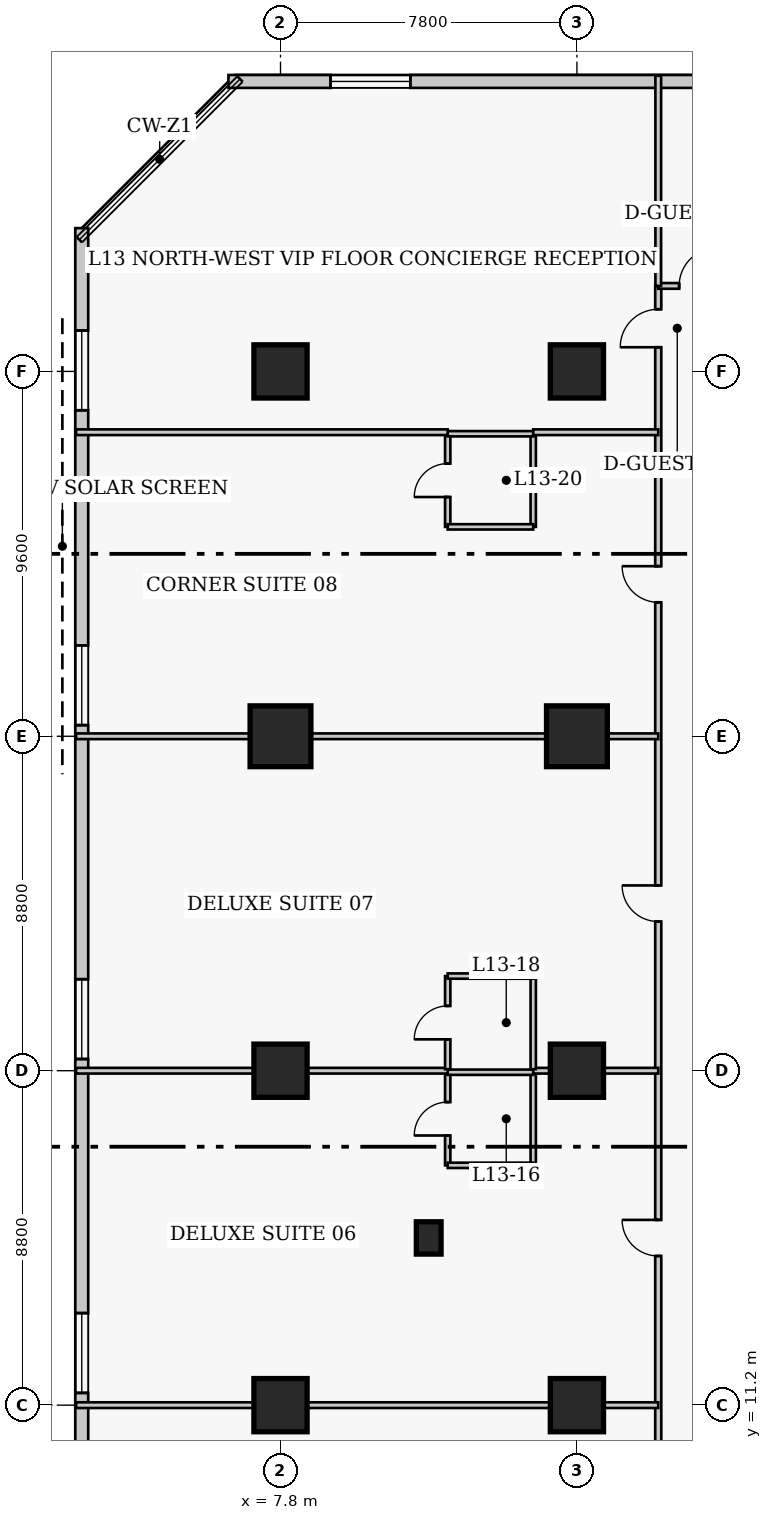
"""IFC4 building model, lengths in metres.
Left out: names, types, materials, properties, quantities, classifications, styles, units other than length and angle.
Written with IfcOpenShell. Run it as: python <this file> out.ifc"""

import sys

from ifc_helpers import new_model, si_unit, direction, frame, frame_2d, origin, origin_2d, place, context, subcontext, project, spatial, rectangle, extrude, element, fill, save


model = new_model("IFC4")
c1 = context("Model", 3, precision=1e-05, world=origin(), true_north=direction((0.0, 1.0)))
c2 = subcontext(c1, "Body", "Model", "MODEL_VIEW")
j1 = project(units=[si_unit("LENGTHUNIT", "METRE"), si_unit("PLANEANGLEUNIT", "RADIAN")], contexts=[c1])
p1 = place(None, origin())
s1 = spatial("IfcSite", under=j1, at=p1, CompositionType="ELEMENT")
p2 = place(p1, origin())
s2 = spatial("IfcBuilding", under=s1, at=p2, CompositionType="ELEMENT")
p3 = place(p2, frame((0.0, 0.0, 56.4)))
s3 = spatial("IfcBuildingStorey", under=s2, at=p3, CompositionType="ELEMENT", Elevation=56.4)
for number, where, z_axis, x_axis in (
    (1, (7.8, 11.2, 0.0), (0.0, 0.0, 1.0), (1.0, 0.0, 0.0)),
    (2, (7.8, 20.0, 0.0), (0.0, 0.0, 1.0), (1.0, 0.0, 0.0)),
):
    element("IfcColumn", number, at=place(p3, frame(where, z_axis=z_axis, x_axis=x_axis)), inside=s3, PredefinedType="COLUMN", context=c2, shape_type="SweptSolid", body=[
        extrude(rectangle(XDim=1.4, YDim=1.4, at=origin_2d()), origin(), (0.0, 0.0, 1.0), 3.8),
    ])
p4 = place(p3, frame((7.8, 28.8, 0.0), z_axis=(0.0, 0.0, 1.0), x_axis=(1.0, 0.0, 0.0)))
e3 = element("IfcColumn", 3, at=p4, inside=s3, PredefinedType="COLUMN", context=c2, shape_type="SweptSolid", body=[
    extrude(rectangle(XDim=1.6, YDim=1.6, at=origin_2d()), origin(), (0.0, 0.0, 1.0), 3.8),
])
for number, where, z_axis, x_axis in (
    (4, (7.8, 38.4, 0.0), (0.0, 0.0, 1.0), (1.0, 0.0, 0.0)),
    (5, (15.6, 11.2, 0.0), (0.0, 0.0, 1.0), (1.0, 0.0, 0.0)),
    (6, (15.6, 20.0, 0.0), (0.0, 0.0, 1.0), (1.0, 0.0, 0.0)),
):
    element("IfcColumn", number, at=place(p3, frame(where, z_axis=z_axis, x_axis=x_axis)), inside=s3, PredefinedType="COLUMN", context=c2, shape_type="SweptSolid", body=[
        extrude(rectangle(XDim=1.4, YDim=1.4, at=origin_2d()), origin(), (0.0, 0.0, 1.0), 3.8),
    ])
p5 = place(p3, frame((15.6, 28.8, 0.0), z_axis=(0.0, 0.0, 1.0), x_axis=(1.0, 0.0, 0.0)))
e7 = element("IfcColumn", 7, at=p5, inside=s3, PredefinedType="COLUMN", context=c2, shape_type="SweptSolid", body=[
    extrude(rectangle(XDim=1.6, YDim=1.6, at=origin_2d()), origin(), (0.0, 0.0, 1.0), 3.8),
])
p6 = place(p3, frame((15.6, 38.4, 0.0), z_axis=(0.0, 0.0, 1.0), x_axis=(1.0, 0.0, 0.0)))
e8 = element("IfcColumn", 8, at=p6, inside=s3, PredefinedType="COLUMN", context=c2, shape_type="SweptSolid", body=[
    extrude(rectangle(XDim=1.4, YDim=1.4, at=origin_2d()), origin(), (0.0, 0.0, 1.0), 3.8),
])
p7 = place(p3, frame((11.7, 15.6, 0.0), z_axis=(0.0, 0.0, 1.0), x_axis=(1.0, 0.0, 0.0)))
e9 = element("IfcColumn", 9, at=p7, inside=s3, PredefinedType="PILASTER", context=c2, shape_type="SweptSolid", body=[
    extrude(rectangle(XDim=0.65, YDim=0.85, at=origin_2d()), origin(), (0.0, 0.0, 1.0), 3.8),
])
p8 = place(p3, frame((36.32, 46.03, 0.0), z_axis=(0.0, 0.0, 1.0), x_axis=(-1.0, 0.0, 0.0)))
e10 = element("IfcWall", 10, at=p8, inside=s3, PredefinedType="SOLIDWALL", context=c2, shape_type="SweptSolid", body=[
    extrude(rectangle(XDim=29.89, YDim=0.34, at=frame_2d((14.945, 0.0))), origin(), (0.0, 0.0, 1.0), 3.54),
])
p9 = place(p8, frame((2.686, 0.0, 0.85)))
e11 = element("IfcOpeningElement", 11, at=p9, cuts=e10, PredefinedType="OPENING", context=c2, shape_type="SweptSolid", body=[
    extrude(rectangle(XDim=2.1, YDim=1.85, at=frame_2d((1.05, 0.925))), frame((0.0, 0.18, 0.0), z_axis=(0.0, -1.0, 0.0), x_axis=(1.0, 0.0, 0.0)), (0.0, 0.0, 1.0), 0.36),
])
p10 = place(p8, frame((10.159, 0.0, 0.85)))
e12 = element("IfcOpeningElement", 12, at=p10, cuts=e10, PredefinedType="OPENING", context=c2, shape_type="SweptSolid", body=[
    extrude(rectangle(XDim=2.1, YDim=1.85, at=frame_2d((1.05, 0.925))), frame((0.0, 0.18, 0.0), z_axis=(0.0, -1.0, 0.0), x_axis=(1.0, 0.0, 0.0)), (0.0, 0.0, 1.0), 0.36),
])
p11 = place(p8, frame((25.104, 0.0, 0.85)))
e13 = element("IfcOpeningElement", 13, at=p11, cuts=e10, PredefinedType="OPENING", context=c2, shape_type="SweptSolid", body=[
    extrude(rectangle(XDim=2.1, YDim=1.85, at=frame_2d((1.05, 0.925))), frame((0.0, 0.18, 0.0), z_axis=(0.0, -1.0, 0.0), x_axis=(1.0, 0.0, 0.0)), (0.0, 0.0, 1.0), 0.36),
])
p12 = place(p3, frame((2.57, 42.17, 0.0), z_axis=(0.0, 0.0, 1.0), x_axis=(0.0, -1.0, 0.0)))
e14 = element("IfcWall", 14, at=p12, inside=s3, PredefinedType="SOLIDWALL", context=c2, shape_type="SweptSolid", body=[
    extrude(rectangle(XDim=35.14, YDim=0.34, at=frame_2d((17.57, 0.0))), origin(), (0.0, 0.0, 1.0), 3.54),
])
p13 = place(p12, frame((2.692, 0.0, 0.85)))
e15 = element("IfcOpeningElement", 15, at=p13, cuts=e14, PredefinedType="OPENING", context=c2, shape_type="SweptSolid", body=[
    extrude(rectangle(XDim=2.1, YDim=1.85, at=frame_2d((1.05, 0.925))), frame((0.0, 0.18, 0.0), z_axis=(0.0, -1.0, 0.0), x_axis=(1.0, 0.0, 0.0)), (0.0, 0.0, 1.0), 0.36),
])
p14 = place(p12, frame((10.978, 0.0, 0.85)))
e16 = element("IfcOpeningElement", 16, at=p14, cuts=e14, PredefinedType="OPENING", context=c2, shape_type="SweptSolid", body=[
    extrude(rectangle(XDim=2.1, YDim=1.85, at=frame_2d((1.05, 0.925))), frame((0.0, 0.18, 0.0), z_axis=(0.0, -1.0, 0.0), x_axis=(1.0, 0.0, 0.0)), (0.0, 0.0, 1.0), 0.36),
])
p15 = place(p12, frame((19.762, 0.0, 0.85)))
e17 = element("IfcOpeningElement", 17, at=p15, cuts=e14, PredefinedType="OPENING", context=c2, shape_type="SweptSolid", body=[
    extrude(rectangle(XDim=2.1, YDim=1.85, at=frame_2d((1.05, 0.925))), frame((0.0, 0.18, 0.0), z_axis=(0.0, -1.0, 0.0), x_axis=(1.0, 0.0, 0.0)), (0.0, 0.0, 1.0), 0.36),
])
p16 = place(p12, frame((28.548, 0.0, 0.85)))
e18 = element("IfcOpeningElement", 18, at=p16, cuts=e14, PredefinedType="OPENING", context=c2, shape_type="SweptSolid", body=[
    extrude(rectangle(XDim=2.1, YDim=1.85, at=frame_2d((1.05, 0.925))), frame((0.0, 0.18, 0.0), z_axis=(0.0, -1.0, 0.0), x_axis=(1.0, 0.0, 0.0)), (0.0, 0.0, 1.0), 0.36),
])
p17 = place(p3, frame((17.74, 5.05, 0.0), z_axis=(0.0, 0.0, 1.0), x_axis=(0.0, 1.0, 0.0)))
e19 = element("IfcWall", 19, at=p17, inside=s3, PredefinedType="PARTITIONING", context=c2, shape_type="SweptSolid", body=[
    extrude(rectangle(XDim=35.6, YDim=0.16, at=frame_2d((17.8, 0.0))), origin(), (0.0, 0.0, 1.0), 3.54),
])
p18 = place(p17, frame((2.6, 0.0, 0.0)))
e20 = element("IfcOpeningElement", 20, at=p18, cuts=e19, PredefinedType="OPENING", context=c2, shape_type="SweptSolid", body=[
    extrude(rectangle(XDim=0.95, YDim=2.1, at=frame_2d((0.475, 1.05))), frame((0.0, 0.09, 0.0), z_axis=(0.0, -1.0, 0.0), x_axis=(1.0, 0.0, 0.0)), (0.0, 0.0, 1.0), 0.18),
])
p19 = place(p17, frame((10.075, 0.0, 0.0)))
e21 = element("IfcOpeningElement", 21, at=p19, cuts=e19, PredefinedType="OPENING", context=c2, shape_type="SweptSolid", body=[
    extrude(rectangle(XDim=0.95, YDim=2.1, at=frame_2d((0.475, 1.05))), frame((0.0, 0.09, 0.0), z_axis=(0.0, -1.0, 0.0), x_axis=(1.0, 0.0, 0.0)), (0.0, 0.0, 1.0), 0.18),
])
p20 = place(p17, frame((18.875, 0.0, 0.0)))
e22 = element("IfcOpeningElement", 22, at=p20, cuts=e19, PredefinedType="OPENING", context=c2, shape_type="SweptSolid", body=[
    extrude(rectangle(XDim=0.95, YDim=2.1, at=frame_2d((0.475, 1.05))), frame((0.0, 0.09, 0.0), z_axis=(0.0, -1.0, 0.0), x_axis=(1.0, 0.0, 0.0)), (0.0, 0.0, 1.0), 0.18),
])
p21 = place(p17, frame((27.275, 0.0, 0.0)))
e23 = element("IfcOpeningElement", 23, at=p21, cuts=e19, PredefinedType="OPENING", context=c2, shape_type="SweptSolid", body=[
    extrude(rectangle(XDim=0.95, YDim=2.1, at=frame_2d((0.475, 1.05))), frame((0.0, 0.09, 0.0), z_axis=(0.0, -1.0, 0.0), x_axis=(1.0, 0.0, 0.0)), (0.0, 0.0, 1.0), 0.18),
])
p22 = place(p17, frame((33.986, 0.0, 0.0)))
e24 = element("IfcOpeningElement", 24, at=p22, cuts=e19, PredefinedType="OPENING", context=c2, shape_type="SweptSolid", body=[
    extrude(rectangle(XDim=1.0, YDim=2.15, at=frame_2d((0.5, 1.075))), frame((0.0, 0.09, 0.0), z_axis=(0.0, -1.0, 0.0), x_axis=(1.0, 0.0, 0.0)), (0.0, 0.0, 1.0), 0.18),
])
p23 = place(p3, frame((17.74, 40.65, 0.0), z_axis=(0.0, 0.0, 1.0), x_axis=(1.0, 0.0, 0.0)))
e25 = element("IfcWall", 25, at=p23, inside=s3, PredefinedType="PARTITIONING", context=c2, shape_type="SweptSolid", body=[
    extrude(rectangle(XDim=4.36, YDim=0.15, at=frame_2d((2.18, 0.0))), origin(), (0.0, 0.0, 1.0), 3.54),
])
p24 = place(p23, frame((0.55, 0.0, 0.0)))
e26 = element("IfcOpeningElement", 26, at=p24, cuts=e25, PredefinedType="OPENING", context=c2, shape_type="SweptSolid", body=[
    extrude(rectangle(XDim=1.0, YDim=2.15, at=frame_2d((0.5, 1.075))), frame((0.0, 0.085, 0.0), z_axis=(0.0, -1.0, 0.0), x_axis=(1.0, 0.0, 0.0)), (0.0, 0.0, 1.0), 0.17),
])
p25 = place(p3, frame((17.74, 40.65, 0.0), z_axis=(0.0, 0.0, 1.0), x_axis=(0.0, 1.0, 0.0)))
e27 = element("IfcWall", 27, at=p25, inside=s3, PredefinedType="PARTITIONING", context=c2, shape_type="SweptSolid", body=[
    extrude(rectangle(XDim=5.53, YDim=0.15, at=frame_2d((2.765, 0.0))), origin(), (0.0, 0.0, 1.0), 3.54),
])
p26 = place(p3, frame((2.42, 11.2, 0.0), z_axis=(0.0, 0.0, 1.0), x_axis=(1.0, 0.0, 0.0)))
e28 = element("IfcWall", 28, at=p26, inside=s3, PredefinedType="PARTITIONING", context=c2, shape_type="SweptSolid", body=[
    extrude(rectangle(XDim=15.32, YDim=0.15, at=frame_2d((7.66, 0.0))), origin(), (0.0, 0.0, 1.0), 2.593),
])
p27 = place(p3, frame((12.2, 17.51, 0.0), z_axis=(0.0, 0.0, 1.0), x_axis=(0.0, 1.0, 0.0)))
e29 = element("IfcWall", 29, at=p27, inside=s3, PredefinedType="PLUMBINGWALL", context=c2, shape_type="SweptSolid", body=[
    extrude(rectangle(XDim=2.45, YDim=0.14, at=frame_2d((1.225, 0.0))), origin(), (0.0, 0.0, 1.0), 3.54),
])
p28 = place(p27, frame((0.785, 0.0, 0.0)))
e30 = element("IfcOpeningElement", 30, at=p28, cuts=e29, PredefinedType="OPENING", context=c2, shape_type="SweptSolid", body=[
    extrude(rectangle(XDim=0.88, YDim=2.05, at=frame_2d((0.44, 1.025))), frame((0.0, 0.08, 0.0), z_axis=(0.0, -1.0, 0.0), x_axis=(1.0, 0.0, 0.0)), (0.0, 0.0, 1.0), 0.16),
])
p29 = place(p3, frame((14.45, 17.51, 0.0), z_axis=(0.0, 0.0, 1.0), x_axis=(0.0, 1.0, 0.0)))
e31 = element("IfcWall", 31, at=p29, inside=s3, PredefinedType="PLUMBINGWALL", context=c2, shape_type="SweptSolid", body=[
    extrude(rectangle(XDim=2.45, YDim=0.14, at=frame_2d((1.225, 0.0))), origin(), (0.0, 0.0, 1.0), 3.54),
])
p30 = place(p3, frame((12.2, 17.51, 0.0), z_axis=(0.0, 0.0, 1.0), x_axis=(1.0, 0.0, 0.0)))
e32 = element("IfcWall", 32, at=p30, inside=s3, PredefinedType="PLUMBINGWALL", context=c2, shape_type="SweptSolid", body=[
    extrude(rectangle(XDim=2.25, YDim=0.14, at=frame_2d((1.125, 0.0))), origin(), (0.0, 0.0, 1.0), 3.54),
])
p31 = place(p3, frame((12.2, 19.96, 0.0), z_axis=(0.0, 0.0, 1.0), x_axis=(1.0, 0.0, 0.0)))
e33 = element("IfcWall", 33, at=p31, inside=s3, PredefinedType="PLUMBINGWALL", context=c2, shape_type="SweptSolid", body=[
    extrude(rectangle(XDim=2.25, YDim=0.14, at=frame_2d((1.125, 0.0))), origin(), (0.0, 0.0, 1.0), 2.593),
])
p32 = place(p3, frame((2.42, 20.0, 0.0), z_axis=(0.0, 0.0, 1.0), x_axis=(1.0, 0.0, 0.0)))
e34 = element("IfcWall", 34, at=p32, inside=s3, PredefinedType="PARTITIONING", context=c2, shape_type="SweptSolid", body=[
    extrude(rectangle(XDim=9.78, YDim=0.15, at=frame_2d((4.89, 0.0))), origin(), (0.0, 0.0, 1.0), 2.593),
])
p33 = place(p3, frame((14.45, 20.0, 0.0), z_axis=(0.0, 0.0, 1.0), x_axis=(1.0, 0.0, 0.0)))
e35 = element("IfcWall", 35, at=p33, inside=s3, PredefinedType="PARTITIONING", context=c2, shape_type="SweptSolid", body=[
    extrude(rectangle(XDim=3.29, YDim=0.15, at=frame_2d((1.645, 0.0))), origin(), (0.0, 0.0, 1.0), 2.593),
])
p34 = place(p3, frame((12.2, 20.04, 0.0), z_axis=(0.0, 0.0, 1.0), x_axis=(0.0, 1.0, 0.0)))
e36 = element("IfcWall", 36, at=p34, inside=s3, PredefinedType="PLUMBINGWALL", context=c2, shape_type="SweptSolid", body=[
    extrude(rectangle(XDim=2.45, YDim=0.14, at=frame_2d((1.225, 0.0))), origin(), (0.0, 0.0, 1.0), 3.54),
])
p35 = place(p34, frame((0.785, 0.0, 0.0)))
e37 = element("IfcOpeningElement", 37, at=p35, cuts=e36, PredefinedType="OPENING", context=c2, shape_type="SweptSolid", body=[
    extrude(rectangle(XDim=0.88, YDim=2.05, at=frame_2d((0.44, 1.025))), frame((0.0, 0.08, 0.0), z_axis=(0.0, -1.0, 0.0), x_axis=(1.0, 0.0, 0.0)), (0.0, 0.0, 1.0), 0.16),
])
p36 = place(p3, frame((14.45, 20.04, 0.0), z_axis=(0.0, 0.0, 1.0), x_axis=(0.0, 1.0, 0.0)))
e38 = element("IfcWall", 38, at=p36, inside=s3, PredefinedType="PLUMBINGWALL", context=c2, shape_type="SweptSolid", body=[
    extrude(rectangle(XDim=2.45, YDim=0.14, at=frame_2d((1.225, 0.0))), origin(), (0.0, 0.0, 1.0), 3.54),
])
p37 = place(p3, frame((12.2, 22.49, 0.0), z_axis=(0.0, 0.0, 1.0), x_axis=(1.0, 0.0, 0.0)))
e39 = element("IfcWall", 39, at=p37, inside=s3, PredefinedType="PLUMBINGWALL", context=c2, shape_type="SweptSolid", body=[
    extrude(rectangle(XDim=2.25, YDim=0.14, at=frame_2d((1.125, 0.0))), origin(), (0.0, 0.0, 1.0), 3.54),
])
p38 = place(p3, frame((2.42, 28.8, 0.0), z_axis=(0.0, 0.0, 1.0), x_axis=(1.0, 0.0, 0.0)))
e40 = element("IfcWall", 40, at=p38, inside=s3, PredefinedType="PARTITIONING", context=c2, shape_type="SweptSolid", body=[
    extrude(rectangle(XDim=15.32, YDim=0.15, at=frame_2d((7.66, 0.0))), origin(), (0.0, 0.0, 1.0), 2.593),
])
p39 = place(p3, frame((12.2, 34.31, 0.0), z_axis=(0.0, 0.0, 1.0), x_axis=(0.0, 1.0, 0.0)))
e41 = element("IfcWall", 41, at=p39, inside=s3, PredefinedType="PLUMBINGWALL", context=c2, shape_type="SweptSolid", body=[
    extrude(rectangle(XDim=2.45, YDim=0.14, at=frame_2d((1.225, 0.0))), origin(), (0.0, 0.0, 1.0), 3.54),
])
p40 = place(p39, frame((0.785, 0.0, 0.0)))
e42 = element("IfcOpeningElement", 42, at=p40, cuts=e41, PredefinedType="OPENING", context=c2, shape_type="SweptSolid", body=[
    extrude(rectangle(XDim=0.88, YDim=2.05, at=frame_2d((0.44, 1.025))), frame((0.0, 0.08, 0.0), z_axis=(0.0, -1.0, 0.0), x_axis=(1.0, 0.0, 0.0)), (0.0, 0.0, 1.0), 0.16),
])
p41 = place(p3, frame((14.45, 34.31, 0.0), z_axis=(0.0, 0.0, 1.0), x_axis=(0.0, 1.0, 0.0)))
e43 = element("IfcWall", 43, at=p41, inside=s3, PredefinedType="PLUMBINGWALL", context=c2, shape_type="SweptSolid", body=[
    extrude(rectangle(XDim=2.45, YDim=0.14, at=frame_2d((1.225, 0.0))), origin(), (0.0, 0.0, 1.0), 3.54),
])
for number, where, z_axis, x_axis in (
    (44, (12.2, 34.31, 0.0), (0.0, 0.0, 1.0), (1.0, 0.0, 0.0)),
    (45, (12.2, 36.76, 0.0), (0.0, 0.0, 1.0), (1.0, 0.0, 0.0)),
):
    element("IfcWall", number, at=place(p3, frame(where, z_axis=z_axis, x_axis=x_axis)), inside=s3, PredefinedType="PLUMBINGWALL", context=c2, shape_type="SweptSolid", body=[
        extrude(rectangle(XDim=2.25, YDim=0.14, at=frame_2d((1.125, 0.0))), origin(), (0.0, 0.0, 1.0), 3.54),
    ])
p42 = place(p3, frame((2.42, 36.8, 0.0), z_axis=(0.0, 0.0, 1.0), x_axis=(1.0, 0.0, 0.0)))
e46 = element("IfcWall", 46, at=p42, inside=s3, PredefinedType="PARTITIONING", context=c2, shape_type="SweptSolid", body=[
    extrude(rectangle(XDim=9.78, YDim=0.15, at=frame_2d((4.89, 0.0))), origin(), (0.0, 0.0, 1.0), 3.54),
])
p43 = place(p3, frame((14.45, 36.8, 0.0), z_axis=(0.0, 0.0, 1.0), x_axis=(1.0, 0.0, 0.0)))
e47 = element("IfcWall", 47, at=p43, inside=s3, PredefinedType="PARTITIONING", context=c2, shape_type="SweptSolid", body=[
    extrude(rectangle(XDim=3.29, YDim=0.15, at=frame_2d((1.645, 0.0))), origin(), (0.0, 0.0, 1.0), 3.54),
])
p44 = place(p11, origin())
e48 = element("IfcWindow", 48, at=p44, inside=s3, PartitioningType="SINGLE_PANEL", PredefinedType="WINDOW", context=c2, shape_type="SweptSolid", body=[
    extrude(rectangle(XDim=2.1, YDim=1.85, at=frame_2d((1.05, 0.925))), frame((0.0, 0.03, 0.0), z_axis=(0.0, -1.0, 0.0), x_axis=(1.0, 0.0, 0.0)), (0.0, 0.0, 1.0), 0.06),
])
fill(e13, e48)
p45 = place(p13, origin())
e49 = element("IfcWindow", 49, at=p45, inside=s3, PartitioningType="SINGLE_PANEL", PredefinedType="WINDOW", context=c2, shape_type="SweptSolid", body=[
    extrude(rectangle(XDim=2.1, YDim=1.85, at=frame_2d((1.05, 0.925))), frame((0.0, 0.03, 0.0), z_axis=(0.0, -1.0, 0.0), x_axis=(1.0, 0.0, 0.0)), (0.0, 0.0, 1.0), 0.06),
])
fill(e15, e49)
p46 = place(p14, origin())
e50 = element("IfcWindow", 50, at=p46, inside=s3, PartitioningType="SINGLE_PANEL", PredefinedType="WINDOW", context=c2, shape_type="SweptSolid", body=[
    extrude(rectangle(XDim=2.1, YDim=1.85, at=frame_2d((1.05, 0.925))), frame((0.0, 0.03, 0.0), z_axis=(0.0, -1.0, 0.0), x_axis=(1.0, 0.0, 0.0)), (0.0, 0.0, 1.0), 0.06),
])
fill(e16, e50)
p47 = place(p15, origin())
e51 = element("IfcWindow", 51, at=p47, inside=s3, PartitioningType="SINGLE_PANEL", PredefinedType="WINDOW", context=c2, shape_type="SweptSolid", body=[
    extrude(rectangle(XDim=2.1, YDim=1.85, at=frame_2d((1.05, 0.925))), frame((0.0, 0.03, 0.0), z_axis=(0.0, -1.0, 0.0), x_axis=(1.0, 0.0, 0.0)), (0.0, 0.0, 1.0), 0.06),
])
fill(e17, e51)
p48 = place(p16, origin())
e52 = element("IfcWindow", 52, at=p48, inside=s3, PartitioningType="SINGLE_PANEL", PredefinedType="WINDOW", context=c2, shape_type="SweptSolid", body=[
    extrude(rectangle(XDim=2.1, YDim=1.85, at=frame_2d((1.05, 0.925))), frame((0.0, 0.03, 0.0), z_axis=(0.0, -1.0, 0.0), x_axis=(1.0, 0.0, 0.0)), (0.0, 0.0, 1.0), 0.06),
])
fill(e18, e52)
p49 = place(p24, origin())
e53 = element("IfcDoor", 53, at=p49, inside=s3, OperationType="SINGLE_SWING_RIGHT", PredefinedType="DOOR", context=c2, shape_type="SweptSolid", body=[
    extrude(rectangle(XDim=1.0, YDim=2.15, at=frame_2d((0.5, 1.075))), frame((0.0, 0.025, 0.0), z_axis=(0.0, -1.0, 0.0), x_axis=(1.0, 0.0, 0.0)), (0.0, 0.0, 1.0), 0.05),
])
fill(e26, e53)
p50 = place(p28, origin())
e54 = element("IfcDoor", 54, at=p50, inside=s3, OperationType="SINGLE_SWING_LEFT", PredefinedType="DOOR", context=c2, shape_type="SweptSolid", body=[
    extrude(rectangle(XDim=0.88, YDim=2.05, at=frame_2d((0.44, 1.025))), frame((0.0, 0.025, 0.0), z_axis=(0.0, -1.0, 0.0), x_axis=(1.0, 0.0, 0.0)), (0.0, 0.0, 1.0), 0.05),
])
fill(e30, e54)
p51 = place(p19, origin())
e55 = element("IfcDoor", 55, at=p51, inside=s3, OperationType="SINGLE_SWING_RIGHT", PredefinedType="DOOR", context=c2, shape_type="SweptSolid", body=[
    extrude(rectangle(XDim=0.95, YDim=2.1, at=frame_2d((0.475, 1.05))), frame((0.0, 0.025, 0.0), z_axis=(0.0, -1.0, 0.0), x_axis=(1.0, 0.0, 0.0)), (0.0, 0.0, 1.0), 0.05),
])
fill(e21, e55)
p52 = place(p35, origin())
e56 = element("IfcDoor", 56, at=p52, inside=s3, OperationType="SINGLE_SWING_LEFT", PredefinedType="DOOR", context=c2, shape_type="SweptSolid", body=[
    extrude(rectangle(XDim=0.88, YDim=2.05, at=frame_2d((0.44, 1.025))), frame((0.0, 0.025, 0.0), z_axis=(0.0, -1.0, 0.0), x_axis=(1.0, 0.0, 0.0)), (0.0, 0.0, 1.0), 0.05),
])
fill(e37, e56)
p53 = place(p20, origin())
e57 = element("IfcDoor", 57, at=p53, inside=s3, OperationType="SINGLE_SWING_RIGHT", PredefinedType="DOOR", context=c2, shape_type="SweptSolid", body=[
    extrude(rectangle(XDim=0.95, YDim=2.1, at=frame_2d((0.475, 1.05))), frame((0.0, 0.025, 0.0), z_axis=(0.0, -1.0, 0.0), x_axis=(1.0, 0.0, 0.0)), (0.0, 0.0, 1.0), 0.05),
])
fill(e22, e57)
p54 = place(p40, origin())
e58 = element("IfcDoor", 58, at=p54, inside=s3, OperationType="SINGLE_SWING_LEFT", PredefinedType="DOOR", context=c2, shape_type="SweptSolid", body=[
    extrude(rectangle(XDim=0.88, YDim=2.05, at=frame_2d((0.44, 1.025))), frame((0.0, 0.025, 0.0), z_axis=(0.0, -1.0, 0.0), x_axis=(1.0, 0.0, 0.0)), (0.0, 0.0, 1.0), 0.05),
])
fill(e42, e58)
p55 = place(p21, origin())
e59 = element("IfcDoor", 59, at=p55, inside=s3, OperationType="SINGLE_SWING_RIGHT", PredefinedType="DOOR", context=c2, shape_type="SweptSolid", body=[
    extrude(rectangle(XDim=0.95, YDim=2.1, at=frame_2d((0.475, 1.05))), frame((0.0, 0.025, 0.0), z_axis=(0.0, -1.0, 0.0), x_axis=(1.0, 0.0, 0.0)), (0.0, 0.0, 1.0), 0.05),
])
fill(e23, e59)
p56 = place(p22, origin())
e60 = element("IfcDoor", 60, at=p56, inside=s3, OperationType="SINGLE_SWING_LEFT", PredefinedType="DOOR", context=c2, shape_type="SweptSolid", body=[
    extrude(rectangle(XDim=1.0, YDim=2.15, at=frame_2d((0.5, 1.075))), frame((0.0, 0.025, 0.0), z_axis=(0.0, -1.0, 0.0), x_axis=(1.0, 0.0, 0.0)), (0.0, 0.0, 1.0), 0.05),
])
fill(e24, e60)
save(model, sys.argv[1])
